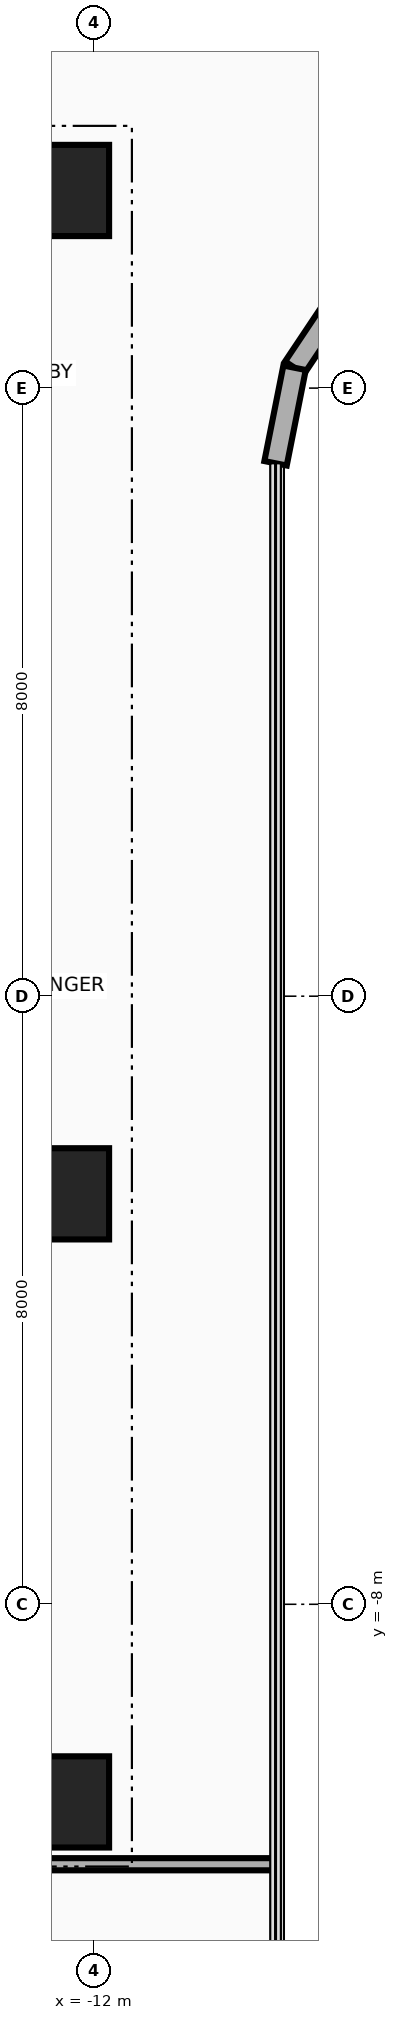
"""IFC4 building model, lengths in metres.
Left out: names, types, materials, properties, quantities, classifications, styles, units other than length and angle.
Written with IfcOpenShell. Run it as: python <this file> out.ifc"""

import sys

from ifc_helpers import new_model, si_unit, direction, frame, frame_2d, origin, origin_2d, place, context, subcontext, project, spatial, rectangle, extrude, source, transform, mapped, element, save


model = new_model("IFC4")
c1 = context("Model", 3, precision=1e-05, world=origin(), true_north=direction((0.0, 1.0)))
c2 = subcontext(c1, "Body", "Model", "MODEL_VIEW")
j1 = project(units=[si_unit("LENGTHUNIT", "METRE"), si_unit("PLANEANGLEUNIT", "RADIAN")], contexts=[c1])
p1 = place(None, origin())
s1 = spatial("IfcSite", under=j1, at=p1, CompositionType="ELEMENT")
p2 = place(p1, origin())
s2 = spatial("IfcBuilding", under=s1, at=p2, CompositionType="ELEMENT")
p3 = place(p2, frame((0.0, 0.0, 120.5)))
s3 = spatial("IfcBuildingStorey", under=s2, at=p3, CompositionType="ELEMENT", Elevation=120.5)
for number, where, z_axis, x_axis in (
    (1, (-22.65, 10.8, 0.0), (0.0, 0.0, 1.0), (1.0, 0.0, 0.0)),
    (2, (-22.65, -10.8, 0.0), (0.0, 0.0, 1.0), (1.0, 0.0, 0.0)),
):
    element("IfcWall", number, at=place(p3, frame(where, z_axis=z_axis, x_axis=x_axis)), inside=s3, PredefinedType="SHEAR", context=c2, shape_type="SweptSolid", body=[
        extrude(rectangle(XDim=10.25, YDim=0.7, at=frame_2d((5.125, 0.0))), origin(), (0.0, 0.0, 1.0), 3.46),
    ])
m1 = source(origin(), c2, "Body", "SweptSolid", [
    extrude(rectangle(XDim=1.2, YDim=1.2, at=origin_2d()), origin(), (0.0, 0.0, 1.0), 3.7),
])
for number, where, z_axis, x_axis in (
    (3, (-12.4, -10.6, 0.0), (0.0, 0.0, 1.0), (1.0, 0.0, 0.0)),
    (4, (-12.4, -2.6, 0.0), (0.0, 0.0, 1.0), (1.0, 0.0, 0.0)),
    (5, (-12.4, 10.6, 0.0), (0.0, 0.0, 1.0), (1.0, 0.0, 0.0)),
):
    element("IfcColumn", number, at=place(p3, frame(where, z_axis=z_axis, x_axis=x_axis)), inside=s3, PredefinedType="COLUMN", context=c2, shape_type="MappedRepresentation", body=[
        mapped(m1, transform((0.0, 0.0, 0.0), x_axis=(1.0, 0.0, 0.0), y_axis=(0.0, 1.0, 0.0), z_axis=(0.0, 0.0, 1.0), scale=1.0)),
    ])
p4 = place(p3, frame((-8.642, 9.342, 0.0), z_axis=(0.0, 0.0, 1.0), x_axis=(-0.555615398575, -0.831439431869, 0.0)))
e6 = element("IfcWall", 6, at=p4, inside=s3, PredefinedType="SOLIDWALL", context=c2, shape_type="SweptSolid", body=[
    extrude(rectangle(XDim=1.292, YDim=0.3, at=frame_2d((0.646, 0.0))), origin(), (0.0, 0.0, 1.0), 3.46),
])
p5 = place(p3, frame((-9.36, 8.268, 0.0), z_axis=(0.0, 0.0, 1.0), x_axis=(-0.195090163074, -0.980785312019, 0.0)))
e7 = element("IfcWall", 7, at=p5, inside=s3, PredefinedType="SOLIDWALL", context=c2, shape_type="SweptSolid", body=[
    extrude(rectangle(XDim=1.281, YDim=0.3, at=frame_2d((0.641, 0.0))), origin(), (0.0, 0.0, 1.0), 3.46),
])
p6 = place(p3, frame((-23.45, -11.42, 0.0), z_axis=(0.0, 0.0, 1.0), x_axis=(1.0, 0.0, 0.0)))
e8 = element("IfcWall", 8, at=p6, inside=s3, PredefinedType="PARTITIONING", context=c2, shape_type="SweptSolid", body=[
    extrude(rectangle(XDim=13.84, YDim=0.16, at=frame_2d((6.92, 0.0))), origin(), (0.0, 0.0, 1.0), 2.834),
])
save(model, sys.argv[1])
